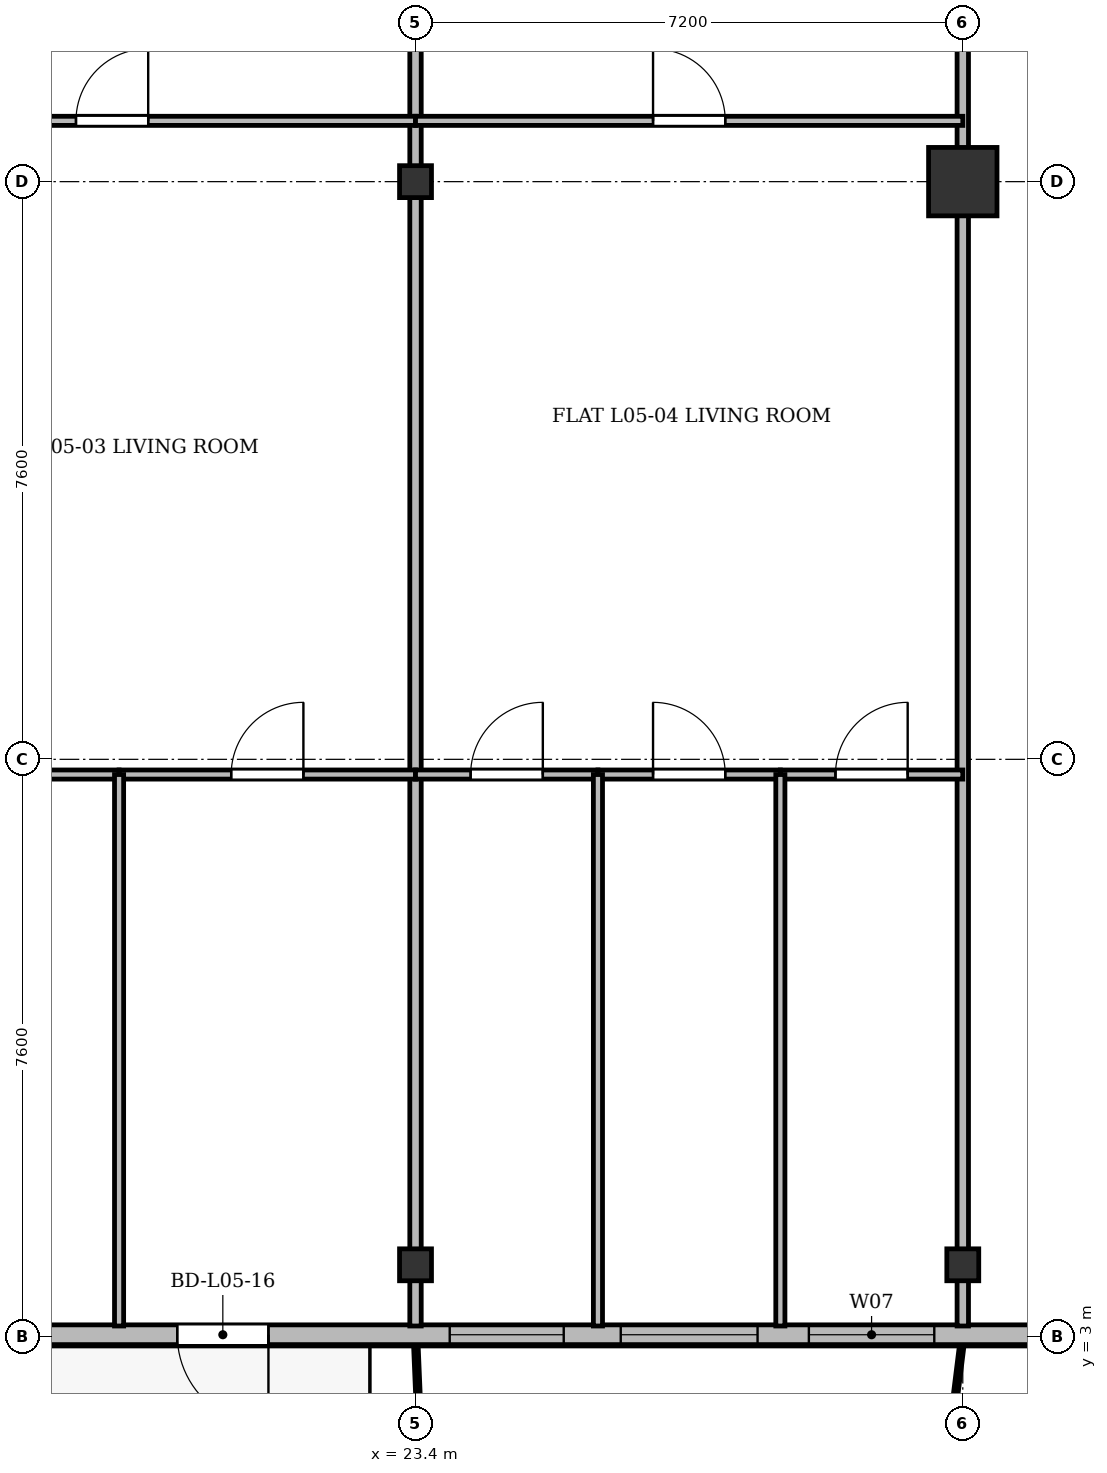
"""IFC4 building model, lengths in metres.
Left out: names, types, materials, properties, quantities, classifications, styles, units other than length and angle.
Written with IfcOpenShell. Run it as: python <this file> out.ifc"""

import sys

from ifc_helpers import new_model, si_unit, direction, frame, frame_2d, origin, origin_2d, place, context, subcontext, project, spatial, rectangle, i_section, extrude, source, transform, mapped, element, fill, save


model = new_model("IFC4")
c1 = context("Model", 3, precision=1e-05, world=origin(), true_north=direction((0.0, 1.0)))
c2 = subcontext(c1, "Body", "Model", "MODEL_VIEW")
j1 = project(units=[si_unit("LENGTHUNIT", "METRE"), si_unit("PLANEANGLEUNIT", "RADIAN")], contexts=[c1])
p1 = place(None, origin())
s1 = spatial("IfcSite", under=j1, at=p1, CompositionType="ELEMENT")
p2 = place(p1, origin())
s2 = spatial("IfcBuilding", under=s1, at=p2, CompositionType="ELEMENT")
p3 = place(p2, frame((0.0, 0.0, 23.5)))
s3 = spatial("IfcBuildingStorey", under=s2, at=p3, CompositionType="ELEMENT", Elevation=23.5)
m1 = source(origin(), c2, "Body", "SweptSolid", [
    extrude(i_section(OverallWidth=0.42, OverallDepth=0.42, WebThickness=0.026, FlangeThickness=0.04, at=origin_2d()), origin(), (0.0, 0.0, 1.0), 3.6),
])
for number, where, z_axis, x_axis in (
    (1, (23.4, 3.95, 0.0), (0.0, 0.0, 1.0), (1.0, 0.0, 0.0)),
    (2, (23.4, 18.2, 0.0), (0.0, 0.0, 1.0), (1.0, 0.0, 0.0)),
    (3, (30.6, 3.95, 0.0), (0.0, 0.0, 1.0), (1.0, 0.0, 0.0)),
):
    element("IfcColumn", number, at=place(p3, frame(where, z_axis=z_axis, x_axis=x_axis)), inside=s3, PredefinedType="COLUMN", context=c2, shape_type="MappedRepresentation", body=[
        mapped(m1, transform((0.0, 0.0, 0.0), x_axis=(1.0, 0.0, 0.0), y_axis=(0.0, 1.0, 0.0), z_axis=(0.0, 0.0, 1.0), scale=1.0)),
    ])
m2 = source(origin(), c2, "Body", "SweptSolid", [
    extrude(rectangle(XDim=0.9, YDim=0.9, at=origin_2d()), origin(), (0.0, 0.0, 1.0), 3.6),
])
p4 = place(p3, frame((30.6, 18.2, 0.0), z_axis=(0.0, 0.0, 1.0), x_axis=(1.0, 0.0, 0.0)))
e4 = element("IfcColumn", 4, at=p4, inside=s3, PredefinedType="COLUMN", context=c2, shape_type="MappedRepresentation", body=[
    mapped(m2, transform((0.0, 0.0, 0.0), x_axis=(1.0, 0.0, 0.0), y_axis=(0.0, 1.0, 0.0), z_axis=(0.0, 0.0, 1.0), scale=1.0)),
])
p5 = place(p3, frame((66.9, 3.03, 0.0), z_axis=(0.0, 0.0, 1.0), x_axis=(-1.0, 0.0, 0.0)))
e5 = element("IfcWall", 5, at=p5, inside=s3, PredefinedType="SOLIDWALL", context=c2, shape_type="SweptSolid", body=[
    extrude(rectangle(XDim=59.4, YDim=0.26, at=frame_2d((29.7, 0.0))), origin(), (0.0, 0.0, 1.0), 3.34),
])
p6 = place(p5, frame((3.6, 0.0, 0.9)))
e6 = element("IfcOpeningElement", 6, at=p6, cuts=e5, PredefinedType="OPENING", context=c2, shape_type="SweptSolid", body=[
    extrude(rectangle(XDim=2.2, YDim=1.8, at=frame_2d((1.1, 0.9))), frame((0.0, 0.14, 0.0), z_axis=(0.0, -1.0, 0.0), x_axis=(1.0, 0.0, 0.0)), (0.0, 0.0, 1.0), 0.28),
])
p7 = place(p5, frame((9.3, 0.0, 0.9)))
e7 = element("IfcOpeningElement", 7, at=p7, cuts=e5, PredefinedType="OPENING", context=c2, shape_type="SweptSolid", body=[
    extrude(rectangle(XDim=1.5, YDim=1.75, at=frame_2d((0.75, 0.875))), frame((0.0, 0.14, 0.0), z_axis=(0.0, -1.0, 0.0), x_axis=(1.0, 0.0, 0.0)), (0.0, 0.0, 1.0), 0.28),
])
p8 = place(p5, frame((12.95, 0.0, 0.9)))
e8 = element("IfcOpeningElement", 8, at=p8, cuts=e5, PredefinedType="OPENING", context=c2, shape_type="SweptSolid", body=[
    extrude(rectangle(XDim=2.0, YDim=1.95, at=frame_2d((1.0, 0.975))), frame((0.0, 0.14, 0.0), z_axis=(0.0, -1.0, 0.0), x_axis=(1.0, 0.0, 0.0)), (0.0, 0.0, 1.0), 0.28),
])
p9 = place(p5, frame((17.007, 0.0, 0.0)))
e9 = element("IfcOpeningElement", 9, at=p9, cuts=e5, PredefinedType="OPENING", context=c2, shape_type="SweptSolid", body=[
    extrude(rectangle(XDim=1.2, YDim=2.2, at=frame_2d((0.6, 1.1))), frame((0.0, 0.14, 0.0), z_axis=(0.0, -1.0, 0.0), x_axis=(1.0, 0.0, 0.0)), (0.0, 0.0, 1.0), 0.28),
])
p10 = place(p5, frame((20.4, 0.0, 0.9)))
e10 = element("IfcOpeningElement", 10, at=p10, cuts=e5, PredefinedType="OPENING", context=c2, shape_type="SweptSolid", body=[
    extrude(rectangle(XDim=1.8, YDim=1.8, at=frame_2d((0.9, 0.9))), frame((0.0, 0.14, 0.0), z_axis=(0.0, -1.0, 0.0), x_axis=(1.0, 0.0, 0.0)), (0.0, 0.0, 1.0), 0.28),
])
p11 = place(p5, frame((23.65, 0.0, 0.9)))
e11 = element("IfcOpeningElement", 11, at=p11, cuts=e5, PredefinedType="OPENING", context=c2, shape_type="SweptSolid", body=[
    extrude(rectangle(XDim=2.2, YDim=1.8, at=frame_2d((1.1, 0.9))), frame((0.0, 0.14, 0.0), z_axis=(0.0, -1.0, 0.0), x_axis=(1.0, 0.0, 0.0)), (0.0, 0.0, 1.0), 0.28),
])
p12 = place(p5, frame((27.3, 0.0, 0.9)))
e12 = element("IfcOpeningElement", 12, at=p12, cuts=e5, PredefinedType="OPENING", context=c2, shape_type="SweptSolid", body=[
    extrude(rectangle(XDim=1.5, YDim=1.75, at=frame_2d((0.75, 0.875))), frame((0.0, 0.14, 0.0), z_axis=(0.0, -1.0, 0.0), x_axis=(1.0, 0.0, 0.0)), (0.0, 0.0, 1.0), 0.28),
])
p13 = place(p5, frame((32.0, 0.0, 0.9)))
e13 = element("IfcOpeningElement", 13, at=p13, cuts=e5, PredefinedType="OPENING", context=c2, shape_type="SweptSolid", body=[
    extrude(rectangle(XDim=2.0, YDim=1.95, at=frame_2d((1.0, 0.975))), frame((0.0, 0.14, 0.0), z_axis=(0.0, -1.0, 0.0), x_axis=(1.0, 0.0, 0.0)), (0.0, 0.0, 1.0), 0.28),
])
p14 = place(p5, frame((36.675, 0.0, 0.9)))
e14 = element("IfcOpeningElement", 14, at=p14, cuts=e5, PredefinedType="OPENING", context=c2, shape_type="SweptSolid", body=[
    extrude(rectangle(XDim=1.65, YDim=1.85, at=frame_2d((0.825, 0.925))), frame((0.0, 0.14, 0.0), z_axis=(0.0, -1.0, 0.0), x_axis=(1.0, 0.0, 0.0)), (0.0, 0.0, 1.0), 0.28),
])
p15 = place(p5, frame((39.0, 0.0, 0.9)))
e15 = element("IfcOpeningElement", 15, at=p15, cuts=e5, PredefinedType="OPENING", context=c2, shape_type="SweptSolid", body=[
    extrude(rectangle(XDim=1.8, YDim=1.8, at=frame_2d((0.9, 0.9))), frame((0.0, 0.14, 0.0), z_axis=(0.0, -1.0, 0.0), x_axis=(1.0, 0.0, 0.0)), (0.0, 0.0, 1.0), 0.28),
])
p16 = place(p5, frame((41.55, 0.0, 0.9)))
e16 = element("IfcOpeningElement", 16, at=p16, cuts=e5, PredefinedType="OPENING", context=c2, shape_type="SweptSolid", body=[
    extrude(rectangle(XDim=1.5, YDim=1.75, at=frame_2d((0.75, 0.875))), frame((0.0, 0.14, 0.0), z_axis=(0.0, -1.0, 0.0), x_axis=(1.0, 0.0, 0.0)), (0.0, 0.0, 1.0), 0.28),
])
p17 = place(p5, frame((45.435, 0.0, 0.0)))
e17 = element("IfcOpeningElement", 17, at=p17, cuts=e5, PredefinedType="OPENING", context=c2, shape_type="SweptSolid", body=[
    extrude(rectangle(XDim=1.2, YDim=2.2, at=frame_2d((0.6, 1.1))), frame((0.0, 0.14, 0.0), z_axis=(0.0, -1.0, 0.0), x_axis=(1.0, 0.0, 0.0)), (0.0, 0.0, 1.0), 0.28),
])
p18 = place(p5, frame((48.35, 0.0, 0.9)))
e18 = element("IfcOpeningElement", 18, at=p18, cuts=e5, PredefinedType="OPENING", context=c2, shape_type="SweptSolid", body=[
    extrude(rectangle(XDim=2.0, YDim=1.95, at=frame_2d((1.0, 0.975))), frame((0.0, 0.14, 0.0), z_axis=(0.0, -1.0, 0.0), x_axis=(1.0, 0.0, 0.0)), (0.0, 0.0, 1.0), 0.28),
])
p19 = place(p5, frame((52.175, 0.0, 0.9)))
e19 = element("IfcOpeningElement", 19, at=p19, cuts=e5, PredefinedType="OPENING", context=c2, shape_type="SweptSolid", body=[
    extrude(rectangle(XDim=1.65, YDim=1.85, at=frame_2d((0.825, 0.925))), frame((0.0, 0.14, 0.0), z_axis=(0.0, -1.0, 0.0), x_axis=(1.0, 0.0, 0.0)), (0.0, 0.0, 1.0), 0.28),
])
p20 = place(p5, frame((55.5, 0.0, 0.9)))
e20 = element("IfcOpeningElement", 20, at=p20, cuts=e5, PredefinedType="OPENING", context=c2, shape_type="SweptSolid", body=[
    extrude(rectangle(XDim=1.8, YDim=1.8, at=frame_2d((0.9, 0.9))), frame((0.0, 0.14, 0.0), z_axis=(0.0, -1.0, 0.0), x_axis=(1.0, 0.0, 0.0)), (0.0, 0.0, 1.0), 0.28),
])
for number, where, z_axis, x_axis in (
    (21, (23.4, 3.145, 0.0), (0.0, 0.0, 1.0), (0.0, 1.0, 0.0)),
    (22, (30.6, 3.145, 0.0), (0.0, 0.0, 1.0), (0.0, 1.0, 0.0)),
):
    element("IfcWall", number, at=place(p3, frame(where, z_axis=z_axis, x_axis=x_axis)), inside=s3, PredefinedType="PARTITIONING", context=c2, shape_type="SweptSolid", body=[
        extrude(rectangle(XDim=24.455, YDim=0.15, at=frame_2d((12.228, 0.0))), origin(), (0.0, 0.0, 1.0), 2.752),
    ])
p21 = place(p3, frame((15.6, 19.0, 0.0), z_axis=(0.0, 0.0, 1.0), x_axis=(1.0, 0.0, 0.0)))
e23 = element("IfcWall", 23, at=p21, inside=s3, PredefinedType="PARTITIONING", context=c2, shape_type="SweptSolid", body=[
    extrude(rectangle(XDim=7.8, YDim=0.12, at=frame_2d((3.9, 0.0))), origin(), (0.0, 0.0, 1.0), 2.752),
])
p22 = place(p21, frame((3.333, 0.0, 0.0)))
e24 = element("IfcOpeningElement", 24, at=p22, cuts=e23, PredefinedType="OPENING", context=c2, shape_type="SweptSolid", body=[
    extrude(rectangle(XDim=0.95, YDim=2.15, at=frame_2d((0.475, 1.075))), frame((0.0, 0.07, 0.0), z_axis=(0.0, -1.0, 0.0), x_axis=(1.0, 0.0, 0.0)), (0.0, 0.0, 1.0), 0.14),
])
p23 = place(p3, frame((15.6, 10.4, 0.0), z_axis=(0.0, 0.0, 1.0), x_axis=(1.0, 0.0, 0.0)))
e25 = element("IfcWall", 25, at=p23, inside=s3, PredefinedType="PARTITIONING", context=c2, shape_type="SweptSolid", body=[
    extrude(rectangle(XDim=3.9, YDim=0.12, at=frame_2d((1.95, 0.0))), origin(), (0.0, 0.0, 1.0), 2.752),
])
p24 = place(p23, frame((1.475, 0.0, 0.0)))
e26 = element("IfcOpeningElement", 26, at=p24, cuts=e25, PredefinedType="OPENING", context=c2, shape_type="SweptSolid", body=[
    extrude(rectangle(XDim=0.95, YDim=2.15, at=frame_2d((0.475, 1.075))), frame((0.0, 0.07, 0.0), z_axis=(0.0, -1.0, 0.0), x_axis=(1.0, 0.0, 0.0)), (0.0, 0.0, 1.0), 0.14),
])
p25 = place(p3, frame((19.5, 10.4, 0.0), z_axis=(0.0, 0.0, 1.0), x_axis=(1.0, 0.0, 0.0)))
e27 = element("IfcWall", 27, at=p25, inside=s3, PredefinedType="PARTITIONING", context=c2, shape_type="SweptSolid", body=[
    extrude(rectangle(XDim=3.9, YDim=0.12, at=frame_2d((1.95, 0.0))), origin(), (0.0, 0.0, 1.0), 2.752),
])
p26 = place(p25, frame((1.475, 0.0, 0.0)))
e28 = element("IfcOpeningElement", 28, at=p26, cuts=e27, PredefinedType="OPENING", context=c2, shape_type="SweptSolid", body=[
    extrude(rectangle(XDim=0.95, YDim=2.15, at=frame_2d((0.475, 1.075))), frame((0.0, 0.07, 0.0), z_axis=(0.0, -1.0, 0.0), x_axis=(1.0, 0.0, 0.0)), (0.0, 0.0, 1.0), 0.14),
])
p27 = place(p3, frame((19.5, 3.145, 0.0), z_axis=(0.0, 0.0, 1.0), x_axis=(0.0, 1.0, 0.0)))
e29 = element("IfcWall", 29, at=p27, inside=s3, PredefinedType="PARTITIONING", context=c2, shape_type="SweptSolid", body=[
    extrude(rectangle(XDim=7.255, YDim=0.12, at=frame_2d((3.627, 0.0))), origin(), (0.0, 0.0, 1.0), 2.69),
])
p28 = place(p3, frame((23.4, 19.0, 0.0), z_axis=(0.0, 0.0, 1.0), x_axis=(1.0, 0.0, 0.0)))
e30 = element("IfcWall", 30, at=p28, inside=s3, PredefinedType="PARTITIONING", context=c2, shape_type="SweptSolid", body=[
    extrude(rectangle(XDim=7.2, YDim=0.12, at=frame_2d((3.6, 0.0))), origin(), (0.0, 0.0, 1.0), 2.752),
])
p29 = place(p28, frame((3.125, 0.0, 0.0)))
e31 = element("IfcOpeningElement", 31, at=p29, cuts=e30, PredefinedType="OPENING", context=c2, shape_type="SweptSolid", body=[
    extrude(rectangle(XDim=0.95, YDim=2.15, at=frame_2d((0.475, 1.075))), frame((0.0, 0.07, 0.0), z_axis=(0.0, -1.0, 0.0), x_axis=(1.0, 0.0, 0.0)), (0.0, 0.0, 1.0), 0.14),
])
p30 = place(p3, frame((23.4, 10.4, 0.0), z_axis=(0.0, 0.0, 1.0), x_axis=(1.0, 0.0, 0.0)))
e32 = element("IfcWall", 32, at=p30, inside=s3, PredefinedType="PARTITIONING", context=c2, shape_type="SweptSolid", body=[
    extrude(rectangle(XDim=2.4, YDim=0.12, at=frame_2d((1.2, 0.0))), origin(), (0.0, 0.0, 1.0), 2.752),
])
p31 = place(p30, frame((0.725, 0.0, 0.0)))
e33 = element("IfcOpeningElement", 33, at=p31, cuts=e32, PredefinedType="OPENING", context=c2, shape_type="SweptSolid", body=[
    extrude(rectangle(XDim=0.95, YDim=2.15, at=frame_2d((0.475, 1.075))), frame((0.0, 0.07, 0.0), z_axis=(0.0, -1.0, 0.0), x_axis=(1.0, 0.0, 0.0)), (0.0, 0.0, 1.0), 0.14),
])
p32 = place(p3, frame((25.8, 10.4, 0.0), z_axis=(0.0, 0.0, 1.0), x_axis=(1.0, 0.0, 0.0)))
e34 = element("IfcWall", 34, at=p32, inside=s3, PredefinedType="PARTITIONING", context=c2, shape_type="SweptSolid", body=[
    extrude(rectangle(XDim=2.4, YDim=0.12, at=frame_2d((1.2, 0.0))), origin(), (0.0, 0.0, 1.0), 3.34),
])
p33 = place(p32, frame((0.725, 0.0, 0.0)))
e35 = element("IfcOpeningElement", 35, at=p33, cuts=e34, PredefinedType="OPENING", context=c2, shape_type="SweptSolid", body=[
    extrude(rectangle(XDim=0.95, YDim=2.15, at=frame_2d((0.475, 1.075))), frame((0.0, 0.07, 0.0), z_axis=(0.0, -1.0, 0.0), x_axis=(1.0, 0.0, 0.0)), (0.0, 0.0, 1.0), 0.14),
])
p34 = place(p3, frame((25.8, 3.145, 0.0), z_axis=(0.0, 0.0, 1.0), x_axis=(0.0, 1.0, 0.0)))
e36 = element("IfcWall", 36, at=p34, inside=s3, PredefinedType="PARTITIONING", context=c2, shape_type="SweptSolid", body=[
    extrude(rectangle(XDim=7.255, YDim=0.12, at=frame_2d((3.627, 0.0))), origin(), (0.0, 0.0, 1.0), 2.69),
])
p35 = place(p3, frame((28.2, 10.4, 0.0), z_axis=(0.0, 0.0, 1.0), x_axis=(1.0, 0.0, 0.0)))
e37 = element("IfcWall", 37, at=p35, inside=s3, PredefinedType="PARTITIONING", context=c2, shape_type="SweptSolid", body=[
    extrude(rectangle(XDim=2.4, YDim=0.12, at=frame_2d((1.2, 0.0))), origin(), (0.0, 0.0, 1.0), 2.752),
])
p36 = place(p35, frame((0.725, 0.0, 0.0)))
e38 = element("IfcOpeningElement", 38, at=p36, cuts=e37, PredefinedType="OPENING", context=c2, shape_type="SweptSolid", body=[
    extrude(rectangle(XDim=0.95, YDim=2.15, at=frame_2d((0.475, 1.075))), frame((0.0, 0.07, 0.0), z_axis=(0.0, -1.0, 0.0), x_axis=(1.0, 0.0, 0.0)), (0.0, 0.0, 1.0), 0.14),
])
p37 = place(p3, frame((28.2, 3.145, 0.0), z_axis=(0.0, 0.0, 1.0), x_axis=(0.0, 1.0, 0.0)))
e39 = element("IfcWall", 39, at=p37, inside=s3, PredefinedType="PARTITIONING", context=c2, shape_type="SweptSolid", body=[
    extrude(rectangle(XDim=7.255, YDim=0.12, at=frame_2d((3.627, 0.0))), origin(), (0.0, 0.0, 1.0), 2.69),
])
m3 = source(origin(), c2, "Body", "SweptSolid", [
    extrude(rectangle(XDim=1.65, YDim=1.85, at=frame_2d((0.825, 0.925))), frame((0.0, 0.03, 0.0), z_axis=(0.0, -1.0, 0.0), x_axis=(1.0, 0.0, 0.0)), (0.0, 0.0, 1.0), 0.06),
])
p38 = place(p14, origin())
e40 = element("IfcWindow", 40, at=p38, inside=s3, PartitioningType="SINGLE_PANEL", PredefinedType="WINDOW", context=c2, shape_type="MappedRepresentation", body=[
    mapped(m3, transform((0.0, 0.0, 0.0), x_axis=(1.0, 0.0, 0.0), y_axis=(0.0, 1.0, 0.0), z_axis=(0.0, 0.0, 1.0), scale=1.0)),
])
fill(e14, e40)
m4 = source(origin(), c2, "Body", "SweptSolid", [
    extrude(rectangle(XDim=1.8, YDim=1.8, at=frame_2d((0.9, 0.9))), frame((0.0, 0.03, 0.0), z_axis=(0.0, -1.0, 0.0), x_axis=(1.0, 0.0, 0.0)), (0.0, 0.0, 1.0), 0.06),
])
p39 = place(p15, origin())
e41 = element("IfcWindow", 41, at=p39, inside=s3, PartitioningType="SINGLE_PANEL", PredefinedType="WINDOW", context=c2, shape_type="MappedRepresentation", body=[
    mapped(m4, transform((0.0, 0.0, 0.0), x_axis=(1.0, 0.0, 0.0), y_axis=(0.0, 1.0, 0.0), z_axis=(0.0, 0.0, 1.0), scale=1.0)),
])
fill(e15, e41)
m5 = source(origin(), c2, "Body", "SweptSolid", [
    extrude(rectangle(XDim=1.5, YDim=1.75, at=frame_2d((0.75, 0.875))), frame((0.0, 0.03, 0.0), z_axis=(0.0, -1.0, 0.0), x_axis=(1.0, 0.0, 0.0)), (0.0, 0.0, 1.0), 0.06),
])
p40 = place(p16, origin())
e42 = element("IfcWindow", 42, at=p40, inside=s3, PartitioningType="SINGLE_PANEL", PredefinedType="WINDOW", context=c2, shape_type="MappedRepresentation", body=[
    mapped(m5, transform((0.0, 0.0, 0.0), x_axis=(1.0, 0.0, 0.0), y_axis=(0.0, 1.0, 0.0), z_axis=(0.0, 0.0, 1.0), scale=1.0)),
])
fill(e16, e42)
m6 = source(origin(), c2, "Body", "SweptSolid", [
    extrude(rectangle(XDim=1.2, YDim=2.2, at=frame_2d((0.6, 1.1))), frame((0.0, 0.025, 0.0), z_axis=(0.0, -1.0, 0.0), x_axis=(1.0, 0.0, 0.0)), (0.0, 0.0, 1.0), 0.05),
])
p41 = place(p17, origin())
e43 = element("IfcDoor", 43, at=p41, inside=s3, OperationType="SINGLE_SWING_LEFT", PredefinedType="DOOR", context=c2, shape_type="MappedRepresentation", body=[
    mapped(m6, transform((0.0, 0.0, 0.0), x_axis=(1.0, 0.0, 0.0), y_axis=(0.0, 1.0, 0.0), z_axis=(0.0, 0.0, 1.0), scale=1.0)),
])
fill(e17, e43)
m7 = source(origin(), c2, "Body", "SweptSolid", [
    extrude(rectangle(XDim=0.95, YDim=2.15, at=frame_2d((0.475, 1.075))), frame((0.0, 0.025, 0.0), z_axis=(0.0, -1.0, 0.0), x_axis=(1.0, 0.0, 0.0)), (0.0, 0.0, 1.0), 0.05),
])
p42 = place(p22, origin())
e44 = element("IfcDoor", 44, at=p42, inside=s3, OperationType="SINGLE_SWING_RIGHT", PredefinedType="DOOR", context=c2, shape_type="MappedRepresentation", body=[
    mapped(m7, transform((0.0, 0.0, 0.0), x_axis=(1.0, 0.0, 0.0), y_axis=(0.0, 1.0, 0.0), z_axis=(0.0, 0.0, 1.0), scale=1.0)),
])
fill(e24, e44)
p43 = place(p26, origin())
e45 = element("IfcDoor", 45, at=p43, inside=s3, OperationType="SINGLE_SWING_RIGHT", PredefinedType="DOOR", context=c2, shape_type="MappedRepresentation", body=[
    mapped(m7, transform((0.0, 0.0, 0.0), x_axis=(1.0, 0.0, 0.0), y_axis=(0.0, 1.0, 0.0), z_axis=(0.0, 0.0, 1.0), scale=1.0)),
])
fill(e28, e45)
p44 = place(p29, origin())
e46 = element("IfcDoor", 46, at=p44, inside=s3, OperationType="SINGLE_SWING_LEFT", PredefinedType="DOOR", context=c2, shape_type="MappedRepresentation", body=[
    mapped(m7, transform((0.0, 0.0, 0.0), x_axis=(1.0, 0.0, 0.0), y_axis=(0.0, 1.0, 0.0), z_axis=(0.0, 0.0, 1.0), scale=1.0)),
])
fill(e31, e46)
p45 = place(p31, origin())
e47 = element("IfcDoor", 47, at=p45, inside=s3, OperationType="SINGLE_SWING_RIGHT", PredefinedType="DOOR", context=c2, shape_type="MappedRepresentation", body=[
    mapped(m7, transform((0.0, 0.0, 0.0), x_axis=(1.0, 0.0, 0.0), y_axis=(0.0, 1.0, 0.0), z_axis=(0.0, 0.0, 1.0), scale=1.0)),
])
fill(e33, e47)
p46 = place(p33, origin())
e48 = element("IfcDoor", 48, at=p46, inside=s3, OperationType="SINGLE_SWING_LEFT", PredefinedType="DOOR", context=c2, shape_type="MappedRepresentation", body=[
    mapped(m7, transform((0.0, 0.0, 0.0), x_axis=(1.0, 0.0, 0.0), y_axis=(0.0, 1.0, 0.0), z_axis=(0.0, 0.0, 1.0), scale=1.0)),
])
fill(e35, e48)
p47 = place(p36, origin())
e49 = element("IfcDoor", 49, at=p47, inside=s3, OperationType="SINGLE_SWING_RIGHT", PredefinedType="DOOR", context=c2, shape_type="MappedRepresentation", body=[
    mapped(m7, transform((0.0, 0.0, 0.0), x_axis=(1.0, 0.0, 0.0), y_axis=(0.0, 1.0, 0.0), z_axis=(0.0, 0.0, 1.0), scale=1.0)),
])
fill(e38, e49)
save(model, sys.argv[1])
